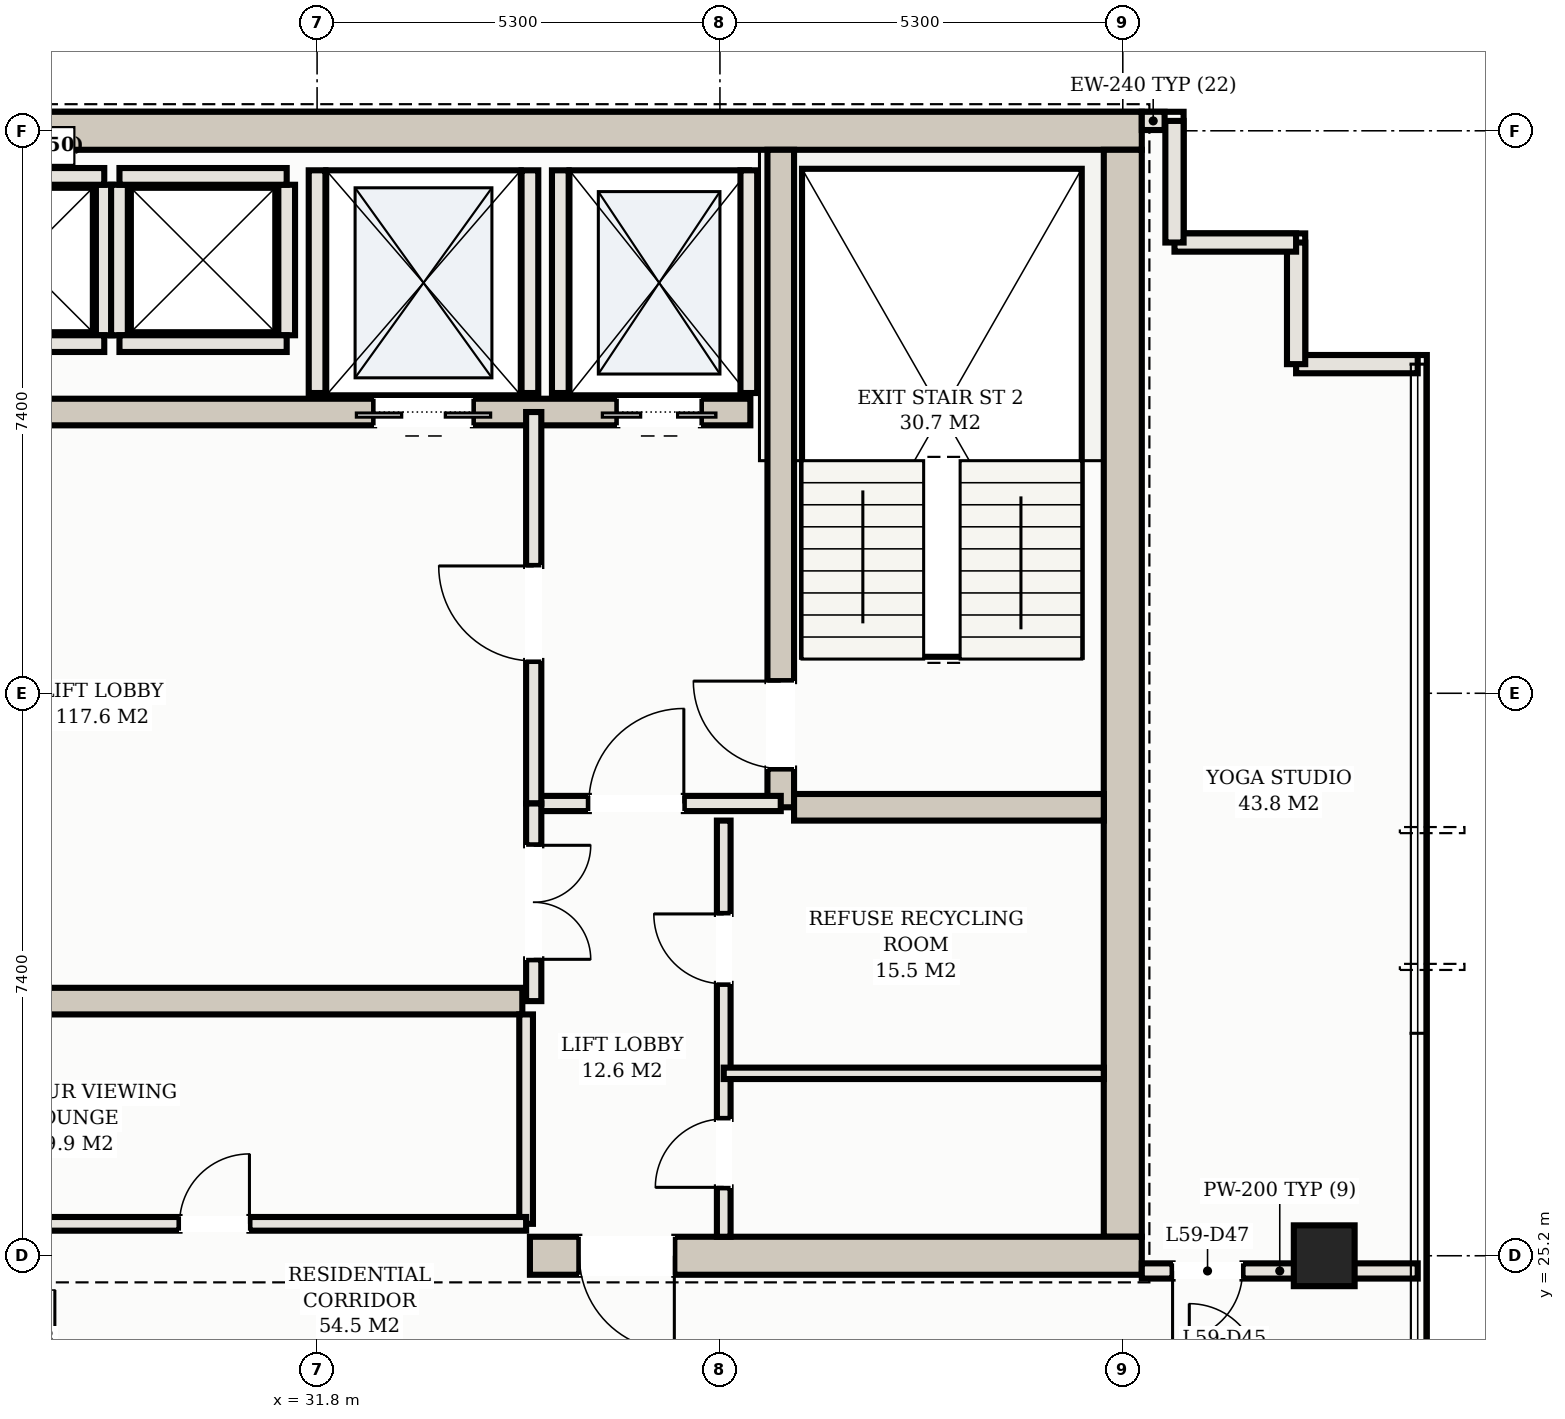
"""IFC4 building model, lengths in metres.
Left out: names, types, materials, properties, quantities, classifications, styles, units other than length and angle.
Written with IfcOpenShell. Run it as: python <this file> out.ifc"""

import sys

from ifc_helpers import new_model, si_unit, direction, frame, frame_2d, origin, origin_2d, place, context, subcontext, project, spatial, rectangle, hollow_rectangle, extrude, element, fill, save


model = new_model("IFC4")
c1 = context("Model", 3, precision=1e-05, world=origin(), true_north=direction((0.0, 1.0)))
c2 = subcontext(c1, "Body", "Model", "MODEL_VIEW")
j1 = project(units=[si_unit("LENGTHUNIT", "METRE"), si_unit("PLANEANGLEUNIT", "RADIAN")], contexts=[c1])
p1 = place(None, origin())
s1 = spatial("IfcSite", under=j1, at=p1, CompositionType="ELEMENT")
p2 = place(p1, origin())
s2 = spatial("IfcBuilding", under=s1, at=p2, CompositionType="ELEMENT")
p3 = place(p2, frame((0.0, 0.0, 216.5)))
s3 = spatial("IfcBuildingStorey", under=s2, at=p3, CompositionType="ELEMENT", Elevation=216.5)
p4 = place(p3, frame((10.35, 40.0, 0.0), z_axis=(0.0, 0.0, 1.0), x_axis=(1.0, 0.0, 0.0)))
e1 = element("IfcWall", 1, at=p4, inside=s3, PredefinedType="SHEAR", context=c2, shape_type="SweptSolid", body=[
    extrude(rectangle(XDim=32.3, YDim=0.5, at=frame_2d((16.15, 0.0))), origin(), (0.0, 0.0, 1.0), 3.11),
])
p5 = place(p3, frame((42.4, 25.45, 0.0), z_axis=(0.0, 0.0, 1.0), x_axis=(0.0, 1.0, 0.0)))
e2 = element("IfcWall", 2, at=p5, inside=s3, PredefinedType="SHEAR", context=c2, shape_type="SweptSolid", body=[
    extrude(rectangle(XDim=14.3, YDim=0.5, at=frame_2d((7.15, 0.0))), origin(), (0.0, 0.0, 1.0), 3.11),
])
p6 = place(p3, frame((34.6, 25.2, 0.0), z_axis=(0.0, 0.0, 1.0), x_axis=(1.0, 0.0, 0.0)))
e3 = element("IfcWall", 3, at=p6, inside=s3, PredefinedType="SHEAR", context=c2, shape_type="SweptSolid", body=[
    extrude(rectangle(XDim=8.05, YDim=0.5, at=frame_2d((4.025, 0.0))), origin(), (0.0, 0.0, 1.0), 3.11),
])
p7 = place(p6, frame((0.65, 0.0, 0.0)))
e4 = element("IfcOpeningElement", 4, at=p7, cuts=e3, PredefinedType="OPENING", context=c2, shape_type="SweptSolid", body=[
    extrude(rectangle(XDim=1.25, YDim=2.2, at=frame_2d((0.625, 1.1))), frame((0.0, 0.26, 0.0), z_axis=(0.0, -1.0, 0.0), x_axis=(1.0, 0.0, 0.0)), (0.0, 0.0, 1.0), 0.52),
])
p8 = place(p3, frame((37.9, 31.1, 0.0), z_axis=(0.0, 0.0, 1.0), x_axis=(0.0, 1.0, 0.0)))
e5 = element("IfcWall", 5, at=p8, inside=s3, PredefinedType="SHEAR", context=c2, shape_type="SweptSolid", body=[
    extrude(rectangle(XDim=8.65, YDim=0.35, at=frame_2d((4.325, 0.0))), origin(), (0.0, 0.0, 1.0), 3.11),
])
p9 = place(p8, frame((0.51, 0.0, 0.0)))
e6 = element("IfcOpeningElement", 6, at=p9, cuts=e5, PredefinedType="OPENING", context=c2, shape_type="SweptSolid", body=[
    extrude(rectangle(XDim=1.15, YDim=2.2, at=frame_2d((0.575, 1.1))), frame((0.0, 0.185, 0.0), z_axis=(0.0, -1.0, 0.0), x_axis=(1.0, 0.0, 0.0)), (0.0, 0.0, 1.0), 0.37),
])
p10 = place(p3, frame((38.075, 31.1, 0.0), z_axis=(0.0, 0.0, 1.0), x_axis=(1.0, 0.0, 0.0)))
e7 = element("IfcWall", 7, at=p10, inside=s3, PredefinedType="SHEAR", context=c2, shape_type="SweptSolid", body=[
    extrude(rectangle(XDim=4.075, YDim=0.35, at=frame_2d((2.038, 0.0))), origin(), (0.0, 0.0, 1.0), 3.11),
])
p11 = place(p3, frame((15.5, 36.3, 0.0), z_axis=(0.0, 0.0, 1.0), x_axis=(1.0, 0.0, 0.0)))
e8 = element("IfcWall", 8, at=p11, inside=s3, PredefinedType="SHEAR", context=c2, shape_type="SweptSolid", body=[
    extrude(rectangle(XDim=22.0, YDim=0.35, at=frame_2d((11.0, 0.0))), origin(), (0.0, 0.0, 1.0), 3.11),
])
p12 = place(p11, frame((0.65, 0.0, 0.0)))
e9 = element("IfcOpeningElement", 9, at=p12, cuts=e8, PredefinedType="OPENING", context=c2, shape_type="SweptSolid", body=[
    extrude(rectangle(XDim=1.1, YDim=2.15, at=frame_2d((0.55, 1.075))), frame((0.0, 0.185, 0.0), z_axis=(0.0, -1.0, 0.0), x_axis=(1.0, 0.0, 0.0)), (0.0, 0.0, 1.0), 0.37),
])
p13 = place(p11, frame((20.25, 0.0, 0.0)))
e10 = element("IfcOpeningElement", 10, at=p13, cuts=e8, PredefinedType="OPENING", context=c2, shape_type="SweptSolid", body=[
    extrude(rectangle(XDim=1.1, YDim=2.15, at=frame_2d((0.55, 1.075))), frame((0.0, 0.185, 0.0), z_axis=(0.0, -1.0, 0.0), x_axis=(1.0, 0.0, 0.0)), (0.0, 0.0, 1.0), 0.37),
])
p14 = place(p11, frame((17.05, 0.0, 0.0)))
e11 = element("IfcOpeningElement", 11, at=p14, cuts=e8, PredefinedType="OPENING", context=c2, shape_type="SweptSolid", body=[
    extrude(rectangle(XDim=1.3, YDim=2.2, at=frame_2d((0.65, 1.1))), frame((0.0, 0.185, 0.0), z_axis=(0.0, -1.0, 0.0), x_axis=(1.0, 0.0, 0.0)), (0.0, 0.0, 1.0), 0.37),
])
p15 = place(p11, frame((3.95, 0.0, 0.0)))
e12 = element("IfcOpeningElement", 12, at=p15, cuts=e8, PredefinedType="OPENING", context=c2, shape_type="SweptSolid", body=[
    extrude(rectangle(XDim=1.1, YDim=2.15, at=frame_2d((0.55, 1.075))), frame((0.0, 0.185, 0.0), z_axis=(0.0, -1.0, 0.0), x_axis=(1.0, 0.0, 0.0)), (0.0, 0.0, 1.0), 0.37),
])
p16 = place(p11, frame((6.55, 0.0, 0.0)))
e13 = element("IfcOpeningElement", 13, at=p16, cuts=e8, PredefinedType="OPENING", context=c2, shape_type="SweptSolid", body=[
    extrude(rectangle(XDim=1.1, YDim=2.15, at=frame_2d((0.55, 1.075))), frame((0.0, 0.185, 0.0), z_axis=(0.0, -1.0, 0.0), x_axis=(1.0, 0.0, 0.0)), (0.0, 0.0, 1.0), 0.37),
])
p17 = place(p11, frame((9.15, 0.0, 0.0)))
e14 = element("IfcOpeningElement", 14, at=p17, cuts=e8, PredefinedType="OPENING", context=c2, shape_type="SweptSolid", body=[
    extrude(rectangle(XDim=1.1, YDim=2.15, at=frame_2d((0.55, 1.075))), frame((0.0, 0.185, 0.0), z_axis=(0.0, -1.0, 0.0), x_axis=(1.0, 0.0, 0.0)), (0.0, 0.0, 1.0), 0.37),
])
p18 = place(p3, frame((18.5, 28.55, 0.0), z_axis=(0.0, 0.0, 1.0), x_axis=(1.0, 0.0, 0.0)))
e15 = element("IfcWall", 15, at=p18, inside=s3, PredefinedType="SHEAR", context=c2, shape_type="SweptSolid", body=[
    extrude(rectangle(XDim=16.0, YDim=0.35, at=frame_2d((8.0, 0.0))), origin(), (0.0, 0.0, 1.0), 3.11),
])
p19 = place(p3, frame((45.05, 25.2, 0.0), z_axis=(0.0, 0.0, 1.0), x_axis=(1.0, 0.0, 0.0)))
e16 = element("IfcColumn", 16, at=p19, inside=s3, PredefinedType="COLUMN", context=c2, shape_type="SweptSolid", body=[
    extrude(hollow_rectangle(XDim=0.8, YDim=0.8, WallThickness=0.028, at=origin_2d()), origin(), (0.0, 0.0, 1.0), 3.3),
])
for number, where, z_axis, x_axis in (
    (17, (35.0, 36.55, 0.0), (0.0, 0.0, 1.0), (0.0, 1.0, 0.0)),
    (18, (37.48, 36.55, 0.0), (0.0, 0.0, 1.0), (0.0, 1.0, 0.0)),
    (19, (31.8, 36.55, 0.0), (0.0, 0.0, 1.0), (0.0, 1.0, 0.0)),
    (20, (34.6, 36.55, 0.0), (0.0, 0.0, 1.0), (0.0, 1.0, 0.0)),
):
    element("IfcWall", number, at=place(p3, frame(where, z_axis=z_axis, x_axis=x_axis)), inside=s3, PredefinedType="SOLIDWALL", context=c2, shape_type="SweptSolid", body=[
        extrude(rectangle(XDim=2.93, YDim=0.22, at=frame_2d((1.465, 0.0))), origin(), (0.0, 0.0, 1.0), 3.11),
    ])
p20 = place(p3, frame((29.0, 37.31, 0.0), z_axis=(0.0, 0.0, 1.0), x_axis=(0.0, 1.0, 0.0)))
e21 = element("IfcWall", 21, at=p20, inside=s3, PredefinedType="SOLIDWALL", context=c2, shape_type="SweptSolid", body=[
    extrude(rectangle(XDim=1.98, YDim=0.22, at=frame_2d((0.99, 0.0))), origin(), (0.0, 0.0, 1.0), 3.11),
])
for number, where, z_axis, x_axis in (
    (22, (26.8, 39.4, 0.0), (0.0, 0.0, 1.0), (1.0, 0.0, 0.0)),
    (23, (26.8, 37.2, 0.0), (0.0, 0.0, 1.0), (1.0, 0.0, 0.0)),
):
    element("IfcWall", number, at=place(p3, frame(where, z_axis=z_axis, x_axis=x_axis)), inside=s3, PredefinedType="SOLIDWALL", context=c2, shape_type="SweptSolid", body=[
        extrude(rectangle(XDim=2.2, YDim=0.22, at=frame_2d((1.1, 0.0))), origin(), (0.0, 0.0, 1.0), 3.11),
    ])
for number, where, z_axis, x_axis in (
    (24, (29.2, 37.31, 0.0), (0.0, 0.0, 1.0), (0.0, 1.0, 0.0)),
    (25, (31.4, 37.31, 0.0), (0.0, 0.0, 1.0), (0.0, 1.0, 0.0)),
):
    element("IfcWall", number, at=place(p3, frame(where, z_axis=z_axis, x_axis=x_axis)), inside=s3, PredefinedType="SOLIDWALL", context=c2, shape_type="SweptSolid", body=[
        extrude(rectangle(XDim=1.98, YDim=0.22, at=frame_2d((0.99, 0.0))), origin(), (0.0, 0.0, 1.0), 3.11),
    ])
for number, where, z_axis, x_axis in (
    (26, (29.2, 39.4, 0.0), (0.0, 0.0, 1.0), (1.0, 0.0, 0.0)),
    (27, (29.2, 37.2, 0.0), (0.0, 0.0, 1.0), (1.0, 0.0, 0.0)),
):
    element("IfcWall", number, at=place(p3, frame(where, z_axis=z_axis, x_axis=x_axis)), inside=s3, PredefinedType="SOLIDWALL", context=c2, shape_type="SweptSolid", body=[
        extrude(rectangle(XDim=2.2, YDim=0.22, at=frame_2d((1.1, 0.0))), origin(), (0.0, 0.0, 1.0), 3.11),
    ])
for number, where, z_axis, x_axis in (
    (28, (46.28, 36.93, 0.0), (0.0, 0.0, 1.0), (-1.0, 0.0, 0.0)),
    (29, (44.68, 36.93, 0.0), (0.0, 0.0, 1.0), (0.0, 1.0, 0.0)),
):
    element("IfcWall", number, at=place(p3, frame(where, z_axis=z_axis, x_axis=x_axis)), inside=s3, PredefinedType="SOLIDWALL", context=c2, shape_type="SweptSolid", body=[
        extrude(rectangle(XDim=1.6, YDim=0.24, at=frame_2d((0.8, 0.0))), origin(), (0.0, 0.0, 1.0), 3.11),
    ])
for number, where, z_axis, x_axis in (
    (30, (44.68, 38.53, 0.0), (0.0, 0.0, 1.0), (-1.0, 0.0, 0.0)),
    (31, (43.08, 38.53, 0.0), (0.0, 0.0, 1.0), (0.0, 1.0, 0.0)),
):
    element("IfcWall", number, at=place(p3, frame(where, z_axis=z_axis, x_axis=x_axis)), inside=s3, PredefinedType="SOLIDWALL", context=c2, shape_type="SweptSolid", body=[
        extrude(rectangle(XDim=1.6, YDim=0.24, at=frame_2d((0.8, 0.0))), origin(), (0.0, 0.0, 1.0), 3.11),
    ])
p21 = place(p3, frame((42.95, 40.13, 0.0), z_axis=(0.0, 0.0, 1.0), x_axis=(-1.0, 0.0, 0.0)))
e32 = element("IfcWall", 32, at=p21, inside=s3, PredefinedType="SOLIDWALL", context=c2, shape_type="SweptSolid", body=[
    extrude(rectangle(XDim=0.3, YDim=0.24, at=frame_2d((0.15, 0.0))), origin(), (0.0, 0.0, 1.0), 3.11),
])
p22 = place(p3, frame((34.65, 31.15, 0.0), z_axis=(0.0, 0.0, 1.0), x_axis=(1.0, 0.0, 0.0)))
e33 = element("IfcWall", 33, at=p22, inside=s3, PredefinedType="PARTITIONING", context=c2, shape_type="SweptSolid", body=[
    extrude(rectangle(XDim=3.25, YDim=0.2, at=frame_2d((1.625, 0.0))), origin(), (0.0, 0.0, 1.0), 2.43),
])
p23 = place(p22, frame((0.725, 0.0, 0.0)))
e34 = element("IfcOpeningElement", 34, at=p23, cuts=e33, PredefinedType="OPENING", context=c2, shape_type="SweptSolid", body=[
    extrude(rectangle(XDim=1.25, YDim=2.2, at=frame_2d((0.625, 1.1))), frame((0.0, 0.11, 0.0), z_axis=(0.0, -1.0, 0.0), x_axis=(1.0, 0.0, 0.0)), (0.0, 0.0, 1.0), 0.22),
])
p24 = place(p3, frame((34.65, 31.15, 0.0), z_axis=(0.0, 0.0, 1.0), x_axis=(0.0, 1.0, 0.0)))
e35 = element("IfcWall", 35, at=p24, inside=s3, PredefinedType="PARTITIONING", context=c2, shape_type="SweptSolid", body=[
    extrude(rectangle(XDim=5.15, YDim=0.2, at=frame_2d((2.575, 0.0))), origin(), (0.0, 0.0, 1.0), 2.43),
])
p25 = place(p24, frame((1.875, 0.0, 0.0)))
e36 = element("IfcOpeningElement", 36, at=p25, cuts=e35, PredefinedType="OPENING", context=c2, shape_type="SweptSolid", body=[
    extrude(rectangle(XDim=1.25, YDim=2.2, at=frame_2d((0.625, 1.1))), frame((0.0, 0.11, 0.0), z_axis=(0.0, -1.0, 0.0), x_axis=(1.0, 0.0, 0.0)), (0.0, 0.0, 1.0), 0.22),
])
p26 = place(p3, frame((37.15, 25.45, 0.0), z_axis=(0.0, 0.0, 1.0), x_axis=(0.0, 1.0, 0.0)))
e37 = element("IfcWall", 37, at=p26, inside=s3, PredefinedType="PARTITIONING", context=c2, shape_type="SweptSolid", body=[
    extrude(rectangle(XDim=5.475, YDim=0.18, at=frame_2d((2.738, 0.0))), origin(), (0.0, 0.0, 1.0), 2.43),
])
p27 = place(p26, frame((0.65, 0.0, 0.0)))
e38 = element("IfcOpeningElement", 38, at=p27, cuts=e37, PredefinedType="OPENING", context=c2, shape_type="SweptSolid", body=[
    extrude(rectangle(XDim=0.9, YDim=2.15, at=frame_2d((0.45, 1.075))), frame((0.0, 0.1, 0.0), z_axis=(0.0, -1.0, 0.0), x_axis=(1.0, 0.0, 0.0)), (0.0, 0.0, 1.0), 0.2),
])
p28 = place(p26, frame((3.327, 0.0, 0.0)))
e39 = element("IfcOpeningElement", 39, at=p28, cuts=e37, PredefinedType="OPENING", context=c2, shape_type="SweptSolid", body=[
    extrude(rectangle(XDim=0.92, YDim=2.15, at=frame_2d((0.46, 1.075))), frame((0.0, 0.1, 0.0), z_axis=(0.0, -1.0, 0.0), x_axis=(1.0, 0.0, 0.0)), (0.0, 0.0, 1.0), 0.2),
])
p29 = place(p3, frame((37.15, 27.6, 0.0), z_axis=(0.0, 0.0, 1.0), x_axis=(1.0, 0.0, 0.0)))
e40 = element("IfcWall", 40, at=p29, inside=s3, PredefinedType="PARTITIONING", context=c2, shape_type="SweptSolid", body=[
    extrude(rectangle(XDim=5.0, YDim=0.15, at=frame_2d((2.5, 0.0))), origin(), (0.0, 0.0, 1.0), 2.43),
])
p30 = place(p3, frame((34.65, 28.55, 0.0), z_axis=(0.0, 0.0, 1.0), x_axis=(0.0, 1.0, 0.0)))
e41 = element("IfcWall", 41, at=p30, inside=s3, PredefinedType="PARTITIONING", context=c2, shape_type="SweptSolid", body=[
    extrude(rectangle(XDim=2.6, YDim=0.2, at=frame_2d((1.3, 0.0))), origin(), (0.0, 0.0, 1.0), 2.43),
])
p31 = place(p30, frame((0.55, 0.0, 0.0)))
e42 = element("IfcOpeningElement", 42, at=p31, cuts=e41, PredefinedType="OPENING", context=c2, shape_type="SweptSolid", body=[
    extrude(rectangle(XDim=1.5, YDim=2.25, at=frame_2d((0.75, 1.125))), frame((0.0, 0.11, 0.0), z_axis=(0.0, -1.0, 0.0), x_axis=(1.0, 0.0, 0.0)), (0.0, 0.0, 1.0), 0.22),
])
p32 = place(p3, frame((34.55, 25.62, 0.0), z_axis=(0.0, 0.0, 1.0), x_axis=(0.0, 1.0, 0.0)))
e43 = element("IfcWall", 43, at=p32, inside=s3, PredefinedType="PARTITIONING", context=c2, shape_type="SweptSolid", body=[
    extrude(rectangle(XDim=2.755, YDim=0.18, at=frame_2d((1.377, 0.0))), origin(), (0.0, 0.0, 1.0), 2.43),
])
p33 = place(p3, frame((26.65, 25.62, 0.0), z_axis=(0.0, 0.0, 1.0), x_axis=(1.0, 0.0, 0.0)))
e44 = element("IfcWall", 44, at=p33, inside=s3, PredefinedType="PARTITIONING", context=c2, shape_type="SweptSolid", body=[
    extrude(rectangle(XDim=7.9, YDim=0.18, at=frame_2d((3.95, 0.0))), origin(), (0.0, 0.0, 1.0), 2.43),
])
p34 = place(p33, frame((3.34, 0.0, 0.0)))
e45 = element("IfcOpeningElement", 45, at=p34, cuts=e44, PredefinedType="OPENING", context=c2, shape_type="SweptSolid", body=[
    extrude(rectangle(XDim=0.92, YDim=2.15, at=frame_2d((0.46, 1.075))), frame((0.0, 0.1, 0.0), z_axis=(0.0, -1.0, 0.0), x_axis=(1.0, 0.0, 0.0)), (0.0, 0.0, 1.0), 0.2),
])
p35 = place(p3, frame((42.65, 25.0, 0.0), z_axis=(0.0, 0.0, 1.0), x_axis=(1.0, 0.0, 0.0)))
e46 = element("IfcWall", 46, at=p35, inside=s3, PredefinedType="PARTITIONING", context=c2, shape_type="SweptSolid", body=[
    extrude(rectangle(XDim=3.63, YDim=0.2, at=frame_2d((1.815, 0.0))), origin(), (0.0, 0.0, 1.0), 2.43),
])
p36 = place(p35, frame((0.405, 0.0, 0.0)))
e47 = element("IfcOpeningElement", 47, at=p36, cuts=e46, PredefinedType="OPENING", context=c2, shape_type="SweptSolid", body=[
    extrude(rectangle(XDim=0.92, YDim=2.15, at=frame_2d((0.46, 1.075))), frame((0.0, 0.11, 0.0), z_axis=(0.0, -1.0, 0.0), x_axis=(1.0, 0.0, 0.0)), (0.0, 0.0, 1.0), 0.22),
])
p37 = place(p13, frame((1.1, 0.0, 0.0), z_axis=(0.0, 0.0, 1.0), x_axis=(-1.0, 0.0, 0.0)))
e48 = element("IfcDoor", 48, at=p37, inside=s3, OperationType="DOUBLE_DOOR_SLIDING", PredefinedType="DOOR", context=c2, shape_type="SweptSolid", body=[
    extrude(rectangle(XDim=1.1, YDim=2.15, at=frame_2d((0.55, 1.075))), frame((0.0, 0.025, 0.0), z_axis=(0.0, -1.0, 0.0), x_axis=(1.0, 0.0, 0.0)), (0.0, 0.0, 1.0), 0.05),
])
fill(e10, e48)
p38 = place(p14, frame((1.3, 0.0, 0.0), z_axis=(0.0, 0.0, 1.0), x_axis=(-1.0, 0.0, 0.0)))
e49 = element("IfcDoor", 49, at=p38, inside=s3, OperationType="DOUBLE_DOOR_SLIDING", PredefinedType="DOOR", context=c2, shape_type="SweptSolid", body=[
    extrude(rectangle(XDim=1.3, YDim=2.2, at=frame_2d((0.65, 1.1))), frame((0.0, 0.025, 0.0), z_axis=(0.0, -1.0, 0.0), x_axis=(1.0, 0.0, 0.0)), (0.0, 0.0, 1.0), 0.05),
])
fill(e11, e49)
p39 = place(p7, frame((1.25, 0.0, 0.0), z_axis=(0.0, 0.0, 1.0), x_axis=(-1.0, 0.0, 0.0)))
e50 = element("IfcDoor", 50, at=p39, inside=s3, OperationType="SINGLE_SWING_LEFT", PredefinedType="DOOR", context=c2, shape_type="SweptSolid", body=[
    extrude(rectangle(XDim=1.25, YDim=2.2, at=frame_2d((0.625, 1.1))), frame((0.0, 0.025, 0.0), z_axis=(0.0, -1.0, 0.0), x_axis=(1.0, 0.0, 0.0)), (0.0, 0.0, 1.0), 0.05),
])
fill(e4, e50)
p40 = place(p23, origin())
e51 = element("IfcDoor", 51, at=p40, inside=s3, OperationType="SINGLE_SWING_RIGHT", PredefinedType="DOOR", context=c2, shape_type="SweptSolid", body=[
    extrude(rectangle(XDim=1.25, YDim=2.2, at=frame_2d((0.625, 1.1))), frame((0.0, 0.025, 0.0), z_axis=(0.0, -1.0, 0.0), x_axis=(1.0, 0.0, 0.0)), (0.0, 0.0, 1.0), 0.05),
])
fill(e34, e51)
p41 = place(p25, origin())
e52 = element("IfcDoor", 52, at=p41, inside=s3, OperationType="SINGLE_SWING_RIGHT", PredefinedType="DOOR", context=c2, shape_type="SweptSolid", body=[
    extrude(rectangle(XDim=1.25, YDim=2.2, at=frame_2d((0.625, 1.1))), frame((0.0, 0.025, 0.0), z_axis=(0.0, -1.0, 0.0), x_axis=(1.0, 0.0, 0.0)), (0.0, 0.0, 1.0), 0.05),
])
fill(e36, e52)
p42 = place(p9, origin())
e53 = element("IfcDoor", 53, at=p42, inside=s3, OperationType="SINGLE_SWING_RIGHT", PredefinedType="DOOR", context=c2, shape_type="SweptSolid", body=[
    extrude(rectangle(XDim=1.15, YDim=2.2, at=frame_2d((0.575, 1.1))), frame((0.0, 0.025, 0.0), z_axis=(0.0, -1.0, 0.0), x_axis=(1.0, 0.0, 0.0)), (0.0, 0.0, 1.0), 0.05),
])
fill(e6, e53)
p43 = place(p27, origin())
e54 = element("IfcDoor", 54, at=p43, inside=s3, OperationType="SINGLE_SWING_LEFT", PredefinedType="DOOR", context=c2, shape_type="SweptSolid", body=[
    extrude(rectangle(XDim=0.9, YDim=2.15, at=frame_2d((0.45, 1.075))), frame((0.0, 0.025, 0.0), z_axis=(0.0, -1.0, 0.0), x_axis=(1.0, 0.0, 0.0)), (0.0, 0.0, 1.0), 0.05),
])
fill(e38, e54)
p44 = place(p28, origin())
e55 = element("IfcDoor", 55, at=p44, inside=s3, OperationType="SINGLE_SWING_RIGHT", PredefinedType="DOOR", context=c2, shape_type="SweptSolid", body=[
    extrude(rectangle(XDim=0.92, YDim=2.15, at=frame_2d((0.46, 1.075))), frame((0.0, 0.025, 0.0), z_axis=(0.0, -1.0, 0.0), x_axis=(1.0, 0.0, 0.0)), (0.0, 0.0, 1.0), 0.05),
])
fill(e39, e55)
p45 = place(p31, frame((1.5, 0.0, 0.0), z_axis=(0.0, 0.0, 1.0), x_axis=(-1.0, 0.0, 0.0)))
e56 = element("IfcDoor", 56, at=p45, inside=s3, OperationType="DOUBLE_DOOR_SINGLE_SWING", PredefinedType="DOOR", context=c2, shape_type="SweptSolid", body=[
    extrude(rectangle(XDim=1.5, YDim=2.25, at=frame_2d((0.75, 1.125))), frame((0.0, 0.025, 0.0), z_axis=(0.0, -1.0, 0.0), x_axis=(1.0, 0.0, 0.0)), (0.0, 0.0, 1.0), 0.05),
])
fill(e42, e56)
p46 = place(p34, origin())
e57 = element("IfcDoor", 57, at=p46, inside=s3, OperationType="SINGLE_SWING_RIGHT", PredefinedType="DOOR", context=c2, shape_type="SweptSolid", body=[
    extrude(rectangle(XDim=0.92, YDim=2.15, at=frame_2d((0.46, 1.075))), frame((0.0, 0.025, 0.0), z_axis=(0.0, -1.0, 0.0), x_axis=(1.0, 0.0, 0.0)), (0.0, 0.0, 1.0), 0.05),
])
fill(e45, e57)
p47 = place(p36, frame((0.92, 0.0, 0.0), z_axis=(0.0, 0.0, 1.0), x_axis=(-1.0, 0.0, 0.0)))
e58 = element("IfcDoor", 58, at=p47, inside=s3, OperationType="SINGLE_SWING_RIGHT", PredefinedType="DOOR", context=c2, shape_type="SweptSolid", body=[
    extrude(rectangle(XDim=0.92, YDim=2.15, at=frame_2d((0.46, 1.075))), frame((0.0, 0.025, 0.0), z_axis=(0.0, -1.0, 0.0), x_axis=(1.0, 0.0, 0.0)), (0.0, 0.0, 1.0), 0.05),
])
fill(e47, e58)
save(model, sys.argv[1])
